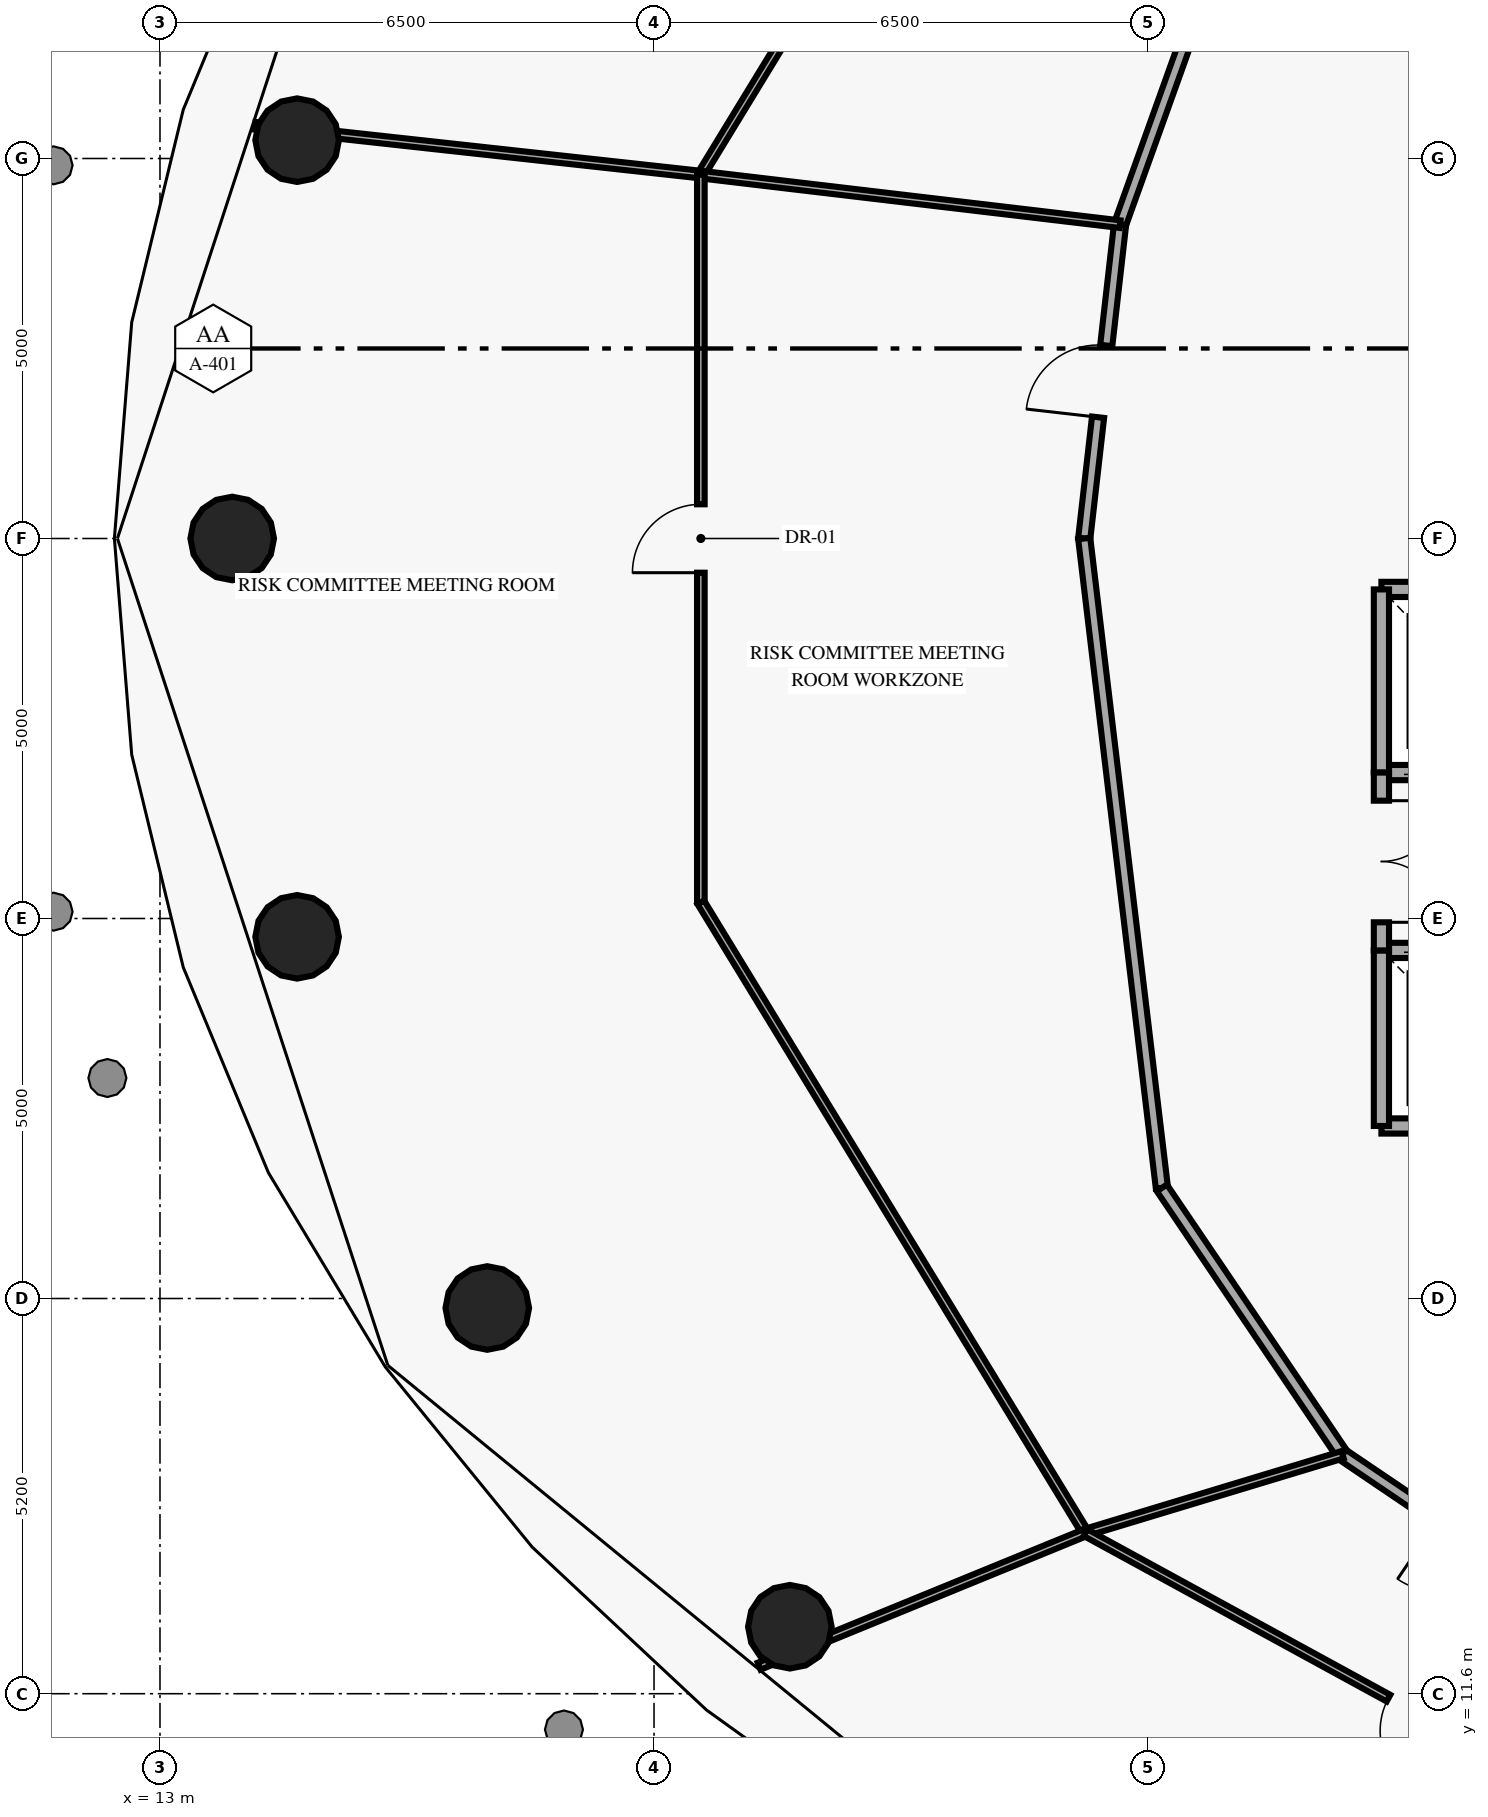
"""IFC4 building model, lengths in metres.
Left out: names, types, materials, properties, quantities, classifications, styles, units other than length and angle.
Written with IfcOpenShell. Run it as: python <this file> out.ifc"""

import sys

from ifc_helpers import new_model, si_unit, direction, frame, frame_2d, origin, origin_2d, place, context, subcontext, project, spatial, rectangle, circle, extrude, element, fill, save


model = new_model("IFC4")
c1 = context("Model", 3, precision=1e-05, world=origin(), true_north=direction((0.0, 1.0)))
c2 = subcontext(c1, "Body", "Model", "MODEL_VIEW")
j1 = project(units=[si_unit("LENGTHUNIT", "METRE"), si_unit("PLANEANGLEUNIT", "RADIAN")], contexts=[c1])
p1 = place(None, origin())
s1 = spatial("IfcSite", under=j1, at=p1, CompositionType="ELEMENT")
p2 = place(p1, origin())
s2 = spatial("IfcBuilding", under=s1, at=p2, CompositionType="ELEMENT")
p3 = place(p2, frame((0.0, 0.0, 65.55)))
s3 = spatial("IfcBuildingStorey", under=s2, at=p3, CompositionType="ELEMENT", Elevation=65.55)
for number, where, z_axis, x_axis in (
    (1, (14.804, 32.041, 0.0), (0.0, 0.0, 1.0), (1.0, 0.0, 0.0)),
    (2, (13.95, 26.8, 0.0), (0.0, 0.0, 1.0), (1.0, 0.0, 0.0)),
    (3, (14.804, 21.559, 0.0), (0.0, 0.0, 1.0), (1.0, 0.0, 0.0)),
    (4, (17.306, 16.675, 0.0), (0.0, 0.0, 1.0), (1.0, 0.0, 0.0)),
    (5, (21.287, 12.481, 0.0), (0.0, 0.0, 1.0), (1.0, 0.0, 0.0)),
):
    element("IfcColumn", number, at=place(p3, frame(where, z_axis=z_axis, x_axis=x_axis)), inside=s3, PredefinedType="COLUMN", context=c2, shape_type="SweptSolid", body=[
        extrude(circle(Radius=0.55, at=origin_2d()), origin(), (0.0, 0.0, 1.0), 3.8),
    ])
p4 = place(p3, frame((29.07, 23.72, 0.0), z_axis=(0.0, 0.0, 1.0), x_axis=(1.0, 0.0, 0.0)))
e6 = element("IfcWall", 6, at=p4, inside=s3, PredefinedType="SOLIDWALL", context=c2, shape_type="SweptSolid", body=[
    extrude(rectangle(XDim=2.31, YDim=0.2, at=frame_2d((1.155, 0.0))), origin(), (0.0, 0.0, 1.0), 3.8),
])
p5 = place(p4, frame((0.605, 0.0, 0.0)))
e7 = element("IfcOpeningElement", 7, at=p5, cuts=e6, PredefinedType="OPENING", context=c2, shape_type="SweptSolid", body=[
    extrude(rectangle(XDim=1.1, YDim=2.15, at=frame_2d((0.55, 1.075))), frame((0.0, 0.11, 0.0), z_axis=(0.0, -1.0, 0.0), x_axis=(1.0, 0.0, 0.0)), (0.0, 0.0, 1.0), 0.22),
])
p6 = place(p3, frame((29.07, 26.13, 0.0), z_axis=(0.0, 0.0, 1.0), x_axis=(1.0, 0.0, 0.0)))
e8 = element("IfcWall", 8, at=p6, inside=s3, PredefinedType="SOLIDWALL", context=c2, shape_type="SweptSolid", body=[
    extrude(rectangle(XDim=2.31, YDim=0.2, at=frame_2d((1.155, 0.0))), origin(), (0.0, 0.0, 1.0), 3.8),
])
p7 = place(p3, frame((29.07, 23.72, 0.0), z_axis=(0.0, 0.0, 1.0), x_axis=(0.0, 1.0, 0.0)))
e9 = element("IfcWall", 9, at=p7, inside=s3, PredefinedType="SOLIDWALL", context=c2, shape_type="SweptSolid", body=[
    extrude(rectangle(XDim=2.41, YDim=0.2, at=frame_2d((1.205, 0.0))), origin(), (0.0, 0.0, 1.0), 3.8),
])
p8 = place(p3, frame((29.07, 19.07, 0.0), z_axis=(0.0, 0.0, 1.0), x_axis=(1.0, 0.0, 0.0)))
e10 = element("IfcWall", 10, at=p8, inside=s3, PredefinedType="SOLIDWALL", context=c2, shape_type="SweptSolid", body=[
    extrude(rectangle(XDim=2.31, YDim=0.2, at=frame_2d((1.155, 0.0))), origin(), (0.0, 0.0, 1.0), 3.8),
])
p9 = place(p3, frame((29.07, 21.38, 0.0), z_axis=(0.0, 0.0, 1.0), x_axis=(1.0, 0.0, 0.0)))
e11 = element("IfcWall", 11, at=p9, inside=s3, PredefinedType="SOLIDWALL", context=c2, shape_type="SweptSolid", body=[
    extrude(rectangle(XDim=2.31, YDim=0.2, at=frame_2d((1.155, 0.0))), origin(), (0.0, 0.0, 1.0), 3.8),
])
p10 = place(p9, frame((0.605, 0.0, 0.0)))
e12 = element("IfcOpeningElement", 12, at=p10, cuts=e11, PredefinedType="OPENING", context=c2, shape_type="SweptSolid", body=[
    extrude(rectangle(XDim=1.1, YDim=2.15, at=frame_2d((0.55, 1.075))), frame((0.0, 0.11, 0.0), z_axis=(0.0, -1.0, 0.0), x_axis=(1.0, 0.0, 0.0)), (0.0, 0.0, 1.0), 0.22),
])
p11 = place(p3, frame((29.07, 19.07, 0.0), z_axis=(0.0, 0.0, 1.0), x_axis=(0.0, 1.0, 0.0)))
e13 = element("IfcWall", 13, at=p11, inside=s3, PredefinedType="SOLIDWALL", context=c2, shape_type="SweptSolid", body=[
    extrude(rectangle(XDim=2.31, YDim=0.2, at=frame_2d((1.155, 0.0))), origin(), (0.0, 0.0, 1.0), 3.8),
])
p12 = place(p3, frame((29.07, 21.38, 0.0), z_axis=(0.0, 0.0, 1.0), x_axis=(0.0, 1.0, 0.0)))
e14 = element("IfcWall", 14, at=p12, inside=s3, PredefinedType="SOLIDWALL", context=c2, shape_type="SweptSolid", body=[
    extrude(rectangle(XDim=2.34, YDim=0.2, at=frame_2d((1.17, 0.0))), origin(), (0.0, 0.0, 1.0), 3.8),
])
p13 = place(p12, frame((0.37, 0.0, 0.0)))
e15 = element("IfcOpeningElement", 15, at=p13, cuts=e14, PredefinedType="OPENING", context=c2, shape_type="SweptSolid", body=[
    extrude(rectangle(XDim=1.6, YDim=2.2, at=frame_2d((0.8, 1.1))), frame((0.0, 0.11, 0.0), z_axis=(0.0, -1.0, 0.0), x_axis=(1.0, 0.0, 0.0)), (0.0, 0.0, 1.0), 0.22),
])
p14 = place(p3, frame((27.014, 34.79, 0.0), z_axis=(0.0, 0.0, 1.0), x_axis=(-0.337507156162, -0.941322962399, 0.0)))
e16 = element("IfcWall", 16, at=p14, inside=s3, PredefinedType="PARTITIONING", context=c2, shape_type="SweptSolid", body=[
    extrude(rectangle(XDim=4.094, YDim=0.16, at=frame_2d((2.047, 0.0))), origin(), (0.0, 0.0, 1.0), 3.8),
])
p15 = place(p3, frame((25.16, 26.8, 0.0), z_axis=(0.0, 0.0, 1.0), x_axis=(0.113424191486, 0.993546653553, 0.0)))
e17 = element("IfcWall", 17, at=p15, inside=s3, PredefinedType="PARTITIONING", context=c2, shape_type="SweptSolid", body=[
    extrude(rectangle(XDim=4.163, YDim=0.16, at=frame_2d((2.082, 0.0))), origin(), (0.0, 0.0, 1.0), 3.8),
])
p16 = place(p15, frame((1.606, 0.0, 0.0)))
e18 = element("IfcOpeningElement", 18, at=p16, cuts=e17, PredefinedType="OPENING", context=c2, shape_type="SweptSolid", body=[
    extrude(rectangle(XDim=0.95, YDim=2.15, at=frame_2d((0.475, 1.075))), frame((0.0, 0.09, 0.0), z_axis=(0.0, -1.0, 0.0), x_axis=(1.0, 0.0, 0.0)), (0.0, 0.0, 1.0), 0.18),
])
p17 = place(p3, frame((25.16, 26.8, 0.0), z_axis=(0.0, 0.0, 1.0), x_axis=(0.11875033489, -0.992924145121, 0.0)))
e19 = element("IfcWall", 19, at=p17, inside=s3, PredefinedType="PARTITIONING", context=c2, shape_type="SweptSolid", body=[
    extrude(rectangle(XDim=8.606, YDim=0.16, at=frame_2d((4.303, 0.0))), origin(), (0.0, 0.0, 1.0), 3.8),
])
p18 = place(p3, frame((26.182, 18.255, 0.0), z_axis=(0.0, 0.0, 1.0), x_axis=(0.560652063277, -0.828051486288, 0.0)))
e20 = element("IfcWall", 20, at=p18, inside=s3, PredefinedType="PARTITIONING", context=c2, shape_type="SweptSolid", body=[
    extrude(rectangle(XDim=4.24, YDim=0.16, at=frame_2d((2.12, 0.0))), origin(), (0.0, 0.0, 1.0), 3.8),
])
p19 = place(p3, frame((31.856, 12.514, 0.0), z_axis=(0.0, 0.0, 1.0), x_axis=(-0.828313553284, 0.560264810108, 0.0)))
e21 = element("IfcWall", 21, at=p19, inside=s3, PredefinedType="PARTITIONING", context=c2, shape_type="SweptSolid", body=[
    extrude(rectangle(XDim=3.98, YDim=0.16, at=frame_2d((1.99, 0.0))), origin(), (0.0, 0.0, 1.0), 3.8),
])
p20 = place(p19, frame((1.515, 0.0, 0.0)))
e22 = element("IfcOpeningElement", 22, at=p20, cuts=e21, PredefinedType="OPENING", context=c2, shape_type="SweptSolid", body=[
    extrude(rectangle(XDim=0.95, YDim=2.15, at=frame_2d((0.475, 1.075))), frame((0.0, 0.09, 0.0), z_axis=(0.0, -1.0, 0.0), x_axis=(1.0, 0.0, 0.0)), (0.0, 0.0, 1.0), 0.18),
])
p21 = place(p3, frame((25.176, 39.88, 0.0), z_axis=(0.0, 0.0, 1.0), x_axis=(-0.520904998728, -0.853614656798, 0.0)))
e23 = element("IfcWall", 23, at=p21, inside=s3, PredefinedType="MOVABLE", context=c2, shape_type="SweptSolid", body=[
    extrude(rectangle(XDim=9.714, YDim=0.1, at=frame_2d((4.857, 0.0))), origin(), (0.0, 0.0, 1.0), 3.8),
])
p22 = place(p3, frame((25.632, 30.936, 0.0), z_axis=(0.0, 0.0, 1.0), x_axis=(-0.993089865622, 0.117356375197, 0.0)))
e24 = element("IfcWall", 24, at=p22, inside=s3, PredefinedType="MOVABLE", context=c2, shape_type="SweptSolid", body=[
    extrude(rectangle(XDim=5.554, YDim=0.1, at=frame_2d((2.777, 0.0))), origin(), (0.0, 0.0, 1.0), 3.8),
])
p23 = place(p3, frame((20.116, 31.588, 0.0), z_axis=(0.0, 0.0, 1.0), x_axis=(-0.994040689629, 0.109009666368, 0.0)))
e25 = element("IfcWall", 25, at=p23, inside=s3, PredefinedType="MOVABLE", context=c2, shape_type="SweptSolid", body=[
    extrude(rectangle(XDim=5.899, YDim=0.1, at=frame_2d((2.95, 0.0))), origin(), (0.0, 0.0, 1.0), 3.8),
])
p24 = place(p3, frame((20.116, 22.012, 0.0), z_axis=(0.0, 0.0, 1.0), x_axis=(0.0, 1.0, 0.0)))
e26 = element("IfcWall", 26, at=p24, inside=s3, PredefinedType="MOVABLE", context=c2, shape_type="SweptSolid", body=[
    extrude(rectangle(XDim=9.576, YDim=0.1, at=frame_2d((4.788, 0.0))), origin(), (0.0, 0.0, 1.0), 3.8),
])
p25 = place(p24, frame((4.338, 0.0, 0.0)))
e27 = element("IfcOpeningElement", 27, at=p25, cuts=e26, PredefinedType="OPENING", context=c2, shape_type="SweptSolid", body=[
    extrude(rectangle(XDim=0.9, YDim=2.1, at=frame_2d((0.45, 1.05))), frame((0.0, 0.06, 0.0), z_axis=(0.0, -1.0, 0.0), x_axis=(1.0, 0.0, 0.0)), (0.0, 0.0, 1.0), 0.12),
])
p26 = place(p3, frame((20.116, 22.012, 0.0), z_axis=(0.0, 0.0, 1.0), x_axis=(0.520904998728, -0.853614656798, 0.0)))
e28 = element("IfcWall", 28, at=p26, inside=s3, PredefinedType="MOVABLE", context=c2, shape_type="SweptSolid", body=[
    extrude(rectangle(XDim=9.714, YDim=0.1, at=frame_2d((4.857, 0.0))), origin(), (0.0, 0.0, 1.0), 3.8),
])
p27 = place(p3, frame((28.559, 14.744, 0.0), z_axis=(0.0, 0.0, 1.0), x_axis=(-0.957121944774, -0.289685316907, 0.0)))
e29 = element("IfcWall", 29, at=p27, inside=s3, PredefinedType="MOVABLE", context=c2, shape_type="SweptSolid", body=[
    extrude(rectangle(XDim=3.535, YDim=0.1, at=frame_2d((1.767, 0.0))), origin(), (0.0, 0.0, 1.0), 3.8),
])
p28 = place(p3, frame((25.176, 13.72, 0.0), z_axis=(0.0, 0.0, 1.0), x_axis=(-0.925407732675, -0.378972991526, 0.0)))
e30 = element("IfcWall", 30, at=p28, inside=s3, PredefinedType="MOVABLE", context=c2, shape_type="SweptSolid", body=[
    extrude(rectangle(XDim=4.639, YDim=0.1, at=frame_2d((2.319, 0.0))), origin(), (0.0, 0.0, 1.0), 3.8),
])
p29 = place(p3, frame((33.94, 8.932, 0.0), z_axis=(0.0, 0.0, 1.0), x_axis=(-0.877568372218, 0.479451511712, 0.0)))
e31 = element("IfcWall", 31, at=p29, inside=s3, PredefinedType="MOVABLE", context=c2, shape_type="SweptSolid", body=[
    extrude(rectangle(XDim=9.987, YDim=0.1, at=frame_2d((4.993, 0.0))), origin(), (0.0, 0.0, 1.0), 3.8),
])
p30 = place(p29, frame((4.543, 0.0, 0.0)))
e32 = element("IfcOpeningElement", 32, at=p30, cuts=e31, PredefinedType="OPENING", context=c2, shape_type="SweptSolid", body=[
    extrude(rectangle(XDim=0.9, YDim=2.1, at=frame_2d((0.45, 1.05))), frame((0.0, 0.06, 0.0), z_axis=(0.0, -1.0, 0.0), x_axis=(1.0, 0.0, 0.0)), (0.0, 0.0, 1.0), 0.12),
])
p31 = place(p13, origin())
e33 = element("IfcDoor", 33, at=p31, inside=s3, OperationType="DOUBLE_DOOR_SINGLE_SWING", PredefinedType="DOOR", context=c2, shape_type="SweptSolid", body=[
    extrude(rectangle(XDim=1.6, YDim=2.2, at=frame_2d((0.8, 1.1))), frame((0.0, 0.025, 0.0), z_axis=(0.0, -1.0, 0.0), x_axis=(1.0, 0.0, 0.0)), (0.0, 0.0, 1.0), 0.05),
])
fill(e15, e33)
p32 = place(p16, origin())
e34 = element("IfcDoor", 34, at=p32, inside=s3, OperationType="SINGLE_SWING_LEFT", PredefinedType="DOOR", context=c2, shape_type="SweptSolid", body=[
    extrude(rectangle(XDim=0.95, YDim=2.15, at=frame_2d((0.475, 1.075))), frame((0.0, 0.025, 0.0), z_axis=(0.0, -1.0, 0.0), x_axis=(1.0, 0.0, 0.0)), (0.0, 0.0, 1.0), 0.05),
])
fill(e18, e34)
p33 = place(p25, origin())
e35 = element("IfcDoor", 35, at=p33, inside=s3, OperationType="SINGLE_SWING_LEFT", PredefinedType="DOOR", context=c2, shape_type="SweptSolid", body=[
    extrude(rectangle(XDim=0.9, YDim=2.1, at=frame_2d((0.45, 1.05))), frame((0.0, 0.025, 0.0), z_axis=(0.0, -1.0, 0.0), x_axis=(1.0, 0.0, 0.0)), (0.0, 0.0, 1.0), 0.05),
])
fill(e27, e35)
p34 = place(p30, origin())
e36 = element("IfcDoor", 36, at=p34, inside=s3, OperationType="SINGLE_SWING_LEFT", PredefinedType="DOOR", context=c2, shape_type="SweptSolid", body=[
    extrude(rectangle(XDim=0.9, YDim=2.1, at=frame_2d((0.45, 1.05))), frame((0.0, 0.025, 0.0), z_axis=(0.0, -1.0, 0.0), x_axis=(1.0, 0.0, 0.0)), (0.0, 0.0, 1.0), 0.05),
])
fill(e32, e36)
save(model, sys.argv[1])
